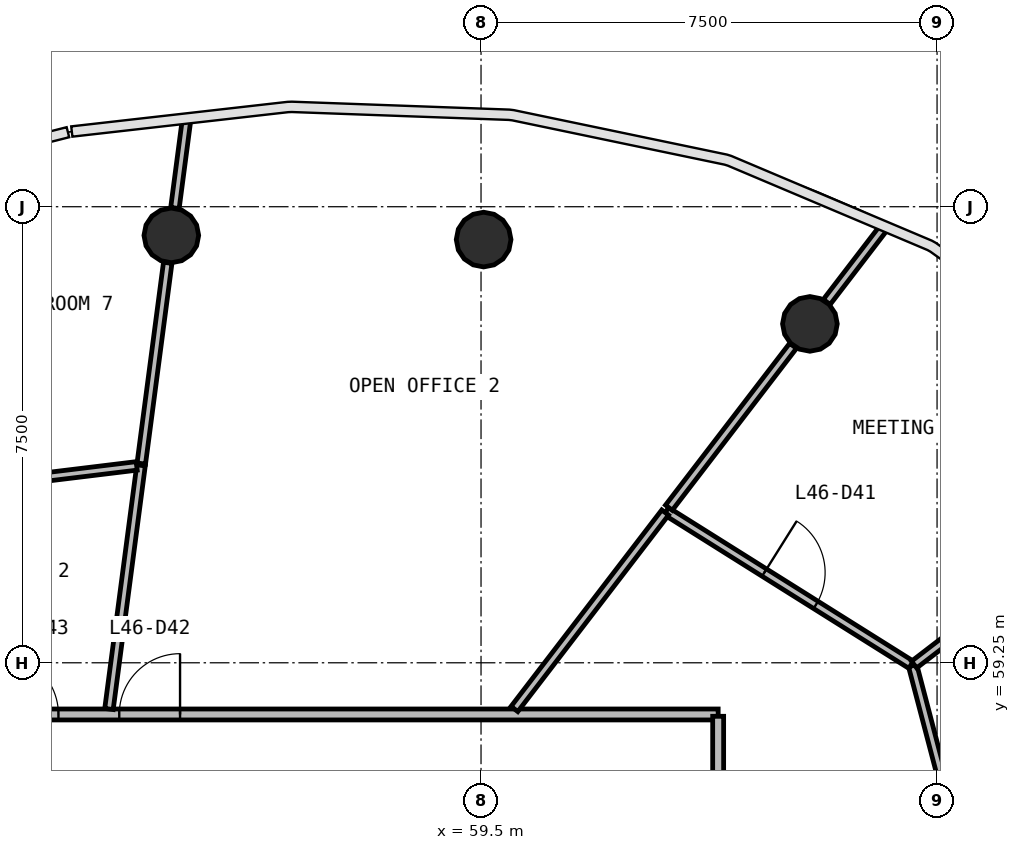
"""IFC4 building model, lengths in metres.
Left out: names, types, materials, properties, quantities, classifications, styles, units other than length and angle.
Written with IfcOpenShell. Run it as: python <this file> out.ifc"""

import sys

from ifc_helpers import new_model, si_unit, direction, frame, frame_2d, origin, origin_2d, place, context, subcontext, project, spatial, rectangle, circle, extrude, source, transform, mapped, element, fill, save


model = new_model("IFC4")
c1 = context("Model", 3, precision=1e-05, world=origin(), true_north=direction((0.0, 1.0)))
c2 = subcontext(c1, "Body", "Model", "MODEL_VIEW")
j1 = project(units=[si_unit("LENGTHUNIT", "METRE"), si_unit("PLANEANGLEUNIT", "RADIAN")], contexts=[c1])
p1 = place(None, origin())
s1 = spatial("IfcSite", under=j1, at=p1, CompositionType="ELEMENT")
p2 = place(p1, origin())
s2 = spatial("IfcBuilding", under=s1, at=p2, CompositionType="ELEMENT")
p3 = place(p2, frame((0.0, 0.0, 191.6)))
s3 = spatial("IfcBuildingStorey", under=s2, at=p3, CompositionType="ELEMENT", Elevation=191.6)
m1 = source(origin(), c2, "Body", "SweptSolid", [
    extrude(circle(Radius=0.45, at=origin_2d()), origin(), (0.0, 0.0, 1.0), 3.9),
])
for number, where, z_axis, x_axis in (
    (1, (64.909, 64.823, 0.0), (0.0, 0.0, 1.0), (1.0, 0.0, 0.0)),
    (2, (59.543, 66.21, 0.0), (0.0, 0.0, 1.0), (1.0, 0.0, 0.0)),
    (3, (54.406, 66.278, 0.0), (0.0, 0.0, 1.0), (1.0, 0.0, 0.0)),
):
    element("IfcColumn", number, at=place(p3, frame(where, z_axis=z_axis, x_axis=x_axis)), inside=s3, PredefinedType="COLUMN", context=c2, shape_type="MappedRepresentation", body=[
        mapped(m1, transform((0.0, 0.0, 0.0), scale=1.0)),
    ])
p4 = place(p3, frame((40.6, 58.4, 0.0), z_axis=(0.0, 0.0, 1.0), x_axis=(1.0, 0.0, 0.0)))
e4 = element("IfcWall", 4, at=p4, inside=s3, PredefinedType="PARTITIONING", context=c2, shape_type="SweptSolid", body=[
    extrude(rectangle(XDim=22.8, YDim=0.18, at=frame_2d((11.4, 0.0))), origin(), (0.0, 0.0, 1.0), 2.88),
])
p5 = place(p4, frame((12.95, 0.0, 0.0)))
e5 = element("IfcOpeningElement", 5, at=p5, cuts=e4, PredefinedType="OPENING", context=c2, shape_type="SweptSolid", body=[
    extrude(rectangle(XDim=1.0, YDim=2.1, at=frame_2d((0.5, 1.05))), frame((0.0, 0.1, 0.0), z_axis=(0.0, -1.0, 0.0), x_axis=(1.0, 0.0, 0.0)), (0.0, 0.0, 1.0), 0.2),
])
p6 = place(p4, frame((10.95, 0.0, 0.0)))
e6 = element("IfcOpeningElement", 6, at=p6, cuts=e4, PredefinedType="OPENING", context=c2, shape_type="SweptSolid", body=[
    extrude(rectangle(XDim=1.0, YDim=2.1, at=frame_2d((0.5, 1.05))), frame((0.0, 0.1, 0.0), z_axis=(0.0, -1.0, 0.0), x_axis=(1.0, 0.0, 0.0)), (0.0, 0.0, 1.0), 0.2),
])
p7 = place(p4, frame((5.75, 0.0, 0.0)))
e7 = element("IfcOpeningElement", 7, at=p7, cuts=e4, PredefinedType="OPENING", context=c2, shape_type="SweptSolid", body=[
    extrude(rectangle(XDim=1.0, YDim=2.1, at=frame_2d((0.5, 1.05))), frame((0.0, 0.1, 0.0), z_axis=(0.0, -1.0, 0.0), x_axis=(1.0, 0.0, 0.0)), (0.0, 0.0, 1.0), 0.2),
])
p8 = place(p3, frame((63.4, 58.37, 0.0), z_axis=(0.0, 0.0, 1.0), x_axis=(0.0, -1.0, 0.0)))
e8 = element("IfcWall", 8, at=p8, inside=s3, PredefinedType="PARTITIONING", context=c2, shape_type="SweptSolid", body=[
    extrude(rectangle(XDim=20.74, YDim=0.18, at=frame_2d((10.37, 0.0))), origin(), (0.0, 0.0, 1.0), 2.88),
])
p9 = place(p8, frame((9.89, 0.0, 0.0)))
e9 = element("IfcOpeningElement", 9, at=p9, cuts=e8, PredefinedType="OPENING", context=c2, shape_type="SweptSolid", body=[
    extrude(rectangle(XDim=1.0, YDim=2.1, at=frame_2d((0.5, 1.05))), frame((0.0, 0.1, 0.0), z_axis=(0.0, -1.0, 0.0), x_axis=(1.0, 0.0, 0.0)), (0.0, 0.0, 1.0), 0.2),
])
p10 = place(p8, frame((7.69, 0.0, 0.0)))
e10 = element("IfcOpeningElement", 10, at=p10, cuts=e8, PredefinedType="OPENING", context=c2, shape_type="SweptSolid", body=[
    extrude(rectangle(XDim=1.0, YDim=2.1, at=frame_2d((0.5, 1.05))), frame((0.0, 0.1, 0.0), z_axis=(0.0, -1.0, 0.0), x_axis=(1.0, 0.0, 0.0)), (0.0, 0.0, 1.0), 0.2),
])
p11 = place(p3, frame((66.599, 59.202, 0.0), z_axis=(0.0, 0.0, 1.0), x_axis=(0.253980714002, -0.967209282893, 0.0)))
e11 = element("IfcWall", 11, at=p11, inside=s3, PredefinedType="PARTITIONING", context=c2, shape_type="SweptSolid", body=[
    extrude(rectangle(XDim=4.736, YDim=0.14, at=frame_2d((2.368, 0.0))), origin(), (0.0, 0.0, 1.0), 2.88),
])
p12 = place(p11, frame((1.886, 0.0, 0.0)))
e12 = element("IfcOpeningElement", 12, at=p12, cuts=e11, PredefinedType="OPENING", context=c2, shape_type="SweptSolid", body=[
    extrude(rectangle(XDim=1.0, YDim=2.1, at=frame_2d((0.5, 1.05))), frame((0.0, 0.08, 0.0), z_axis=(0.0, -1.0, 0.0), x_axis=(1.0, 0.0, 0.0)), (0.0, 0.0, 1.0), 0.16),
])
p13 = place(p3, frame((62.547, 61.745, 0.0), z_axis=(0.0, 0.0, 1.0), x_axis=(0.846992708554, -0.531604506806, 0.0)))
e13 = element("IfcWall", 13, at=p13, inside=s3, PredefinedType="PARTITIONING", context=c2, shape_type="SweptSolid", body=[
    extrude(rectangle(XDim=4.754, YDim=0.14, at=frame_2d((2.377, 0.0))), origin(), (0.0, 0.0, 1.0), 2.88),
])
p14 = place(p13, frame((1.904, 0.0, 0.0)))
e14 = element("IfcOpeningElement", 14, at=p14, cuts=e13, PredefinedType="OPENING", context=c2, shape_type="SweptSolid", body=[
    extrude(rectangle(XDim=1.0, YDim=2.1, at=frame_2d((0.5, 1.05))), frame((0.0, 0.08, 0.0), z_axis=(0.0, -1.0, 0.0), x_axis=(1.0, 0.0, 0.0)), (0.0, 0.0, 1.0), 0.16),
])
p15 = place(p3, frame((60.049, 58.49, 0.0), z_axis=(0.0, 0.0, 1.0), x_axis=(0.608739821429, 0.793369919903, 0.0)))
e15 = element("IfcWall", 15, at=p15, inside=s3, PredefinedType="PARTITIONING", context=c2, shape_type="SweptSolid", body=[
    extrude(rectangle(XDim=4.073, YDim=0.14, at=frame_2d((2.036, 0.0))), origin(), (0.0, 0.0, 1.0), 2.88),
])
p16 = place(p3, frame((53.381, 58.49, 0.0), z_axis=(0.0, 0.0, 1.0), x_axis=(0.130493581912, 0.991449154057, 0.0)))
e16 = element("IfcWall", 16, at=p16, inside=s3, PredefinedType="PARTITIONING", context=c2, shape_type="SweptSolid", body=[
    extrude(rectangle(XDim=4.041, YDim=0.14, at=frame_2d((2.021, 0.0))), origin(), (0.0, 0.0, 1.0), 2.88),
])
p17 = place(p3, frame((50.152, 62.039, 0.0), z_axis=(0.0, 0.0, 1.0), x_axis=(0.992659556224, 0.120942157407, 0.0)))
e17 = element("IfcWall", 17, at=p17, inside=s3, PredefinedType="PARTITIONING", context=c2, shape_type="SweptSolid", body=[
    extrude(rectangle(XDim=3.712, YDim=0.14, at=frame_2d((1.856, 0.0))), origin(), (0.0, 0.0, 1.0), 2.88),
])
p18 = place(p17, frame((1.262, 0.0, 0.0)))
e18 = element("IfcOpeningElement", 18, at=p18, cuts=e17, PredefinedType="OPENING", context=c2, shape_type="SweptSolid", body=[
    extrude(rectangle(XDim=1.0, YDim=2.1, at=frame_2d((0.5, 1.05))), frame((0.0, 0.08, 0.0), z_axis=(0.0, -1.0, 0.0), x_axis=(1.0, 0.0, 0.0)), (0.0, 0.0, 1.0), 0.16),
])
p19 = place(p3, frame((66.622, 59.22, 0.0), z_axis=(0.0, 0.0, 1.0), x_axis=(0.793364115727, 0.60874738593, 0.0)))
e19 = element("IfcWall", 19, at=p19, inside=s3, PredefinedType="PARTITIONING", context=c2, shape_type="SweptSolid", body=[
    extrude(rectangle(XDim=3.553, YDim=0.14, at=frame_2d((1.777, 0.0))), origin(), (0.0, 0.0, 1.0), 2.88),
])
p20 = place(p3, frame((62.59, 61.801, 0.0), z_axis=(0.0, 0.0, 1.0), x_axis=(0.608788963613, 0.793332211487, 0.0)))
e20 = element("IfcWall", 20, at=p20, inside=s3, PredefinedType="PARTITIONING", context=c2, shape_type="SweptSolid", body=[
    extrude(rectangle(XDim=3.355, YDim=0.14, at=frame_2d((1.677, 0.0))), origin(), (0.0, 0.0, 1.0), 2.88),
])
p21 = place(p3, frame((53.912, 62.526, 0.0), z_axis=(0.0, 0.0, 1.0), x_axis=(0.130583483351, 0.991437317169, 0.0)))
e21 = element("IfcWall", 21, at=p21, inside=s3, PredefinedType="PARTITIONING", context=c2, shape_type="SweptSolid", body=[
    extrude(rectangle(XDim=3.33, YDim=0.14, at=frame_2d((1.665, 0.0))), origin(), (0.0, 0.0, 1.0), 2.88),
])
p22 = place(p3, frame((65.186, 65.184, 0.0), z_axis=(0.0, 0.0, 1.0), x_axis=(0.608734333178, 0.793374130919, 0.0)))
e22 = element("IfcWall", 22, at=p22, inside=s3, PredefinedType="PARTITIONING", context=c2, shape_type="SweptSolid", body=[
    extrude(rectangle(XDim=1.523, YDim=0.14, at=frame_2d((0.762, 0.0))), origin(), (0.0, 0.0, 1.0), 2.88),
])
p23 = place(p3, frame((54.466, 66.729, 0.0), z_axis=(0.0, 0.0, 1.0), x_axis=(0.130472090904, 0.991451982445, 0.0)))
e23 = element("IfcWall", 23, at=p23, inside=s3, PredefinedType="PARTITIONING", context=c2, shape_type="SweptSolid", body=[
    extrude(rectangle(XDim=1.437, YDim=0.14, at=frame_2d((0.719, 0.0))), origin(), (0.0, 0.0, 1.0), 2.88),
])
m2 = source(origin(), c2, "Body", "SweptSolid", [
    extrude(rectangle(XDim=1.0, YDim=2.1, at=frame_2d((0.5, 1.05))), frame((0.0, 0.025, 0.0), z_axis=(0.0, -1.0, 0.0), x_axis=(1.0, 0.0, 0.0)), (0.0, 0.0, 1.0), 0.05),
])
p24 = place(p14, origin())
e24 = element("IfcDoor", 24, at=p24, inside=s3, OperationType="SINGLE_SWING_LEFT", PredefinedType="DOOR", context=c2, shape_type="MappedRepresentation", body=[
    mapped(m2, transform((0.0, 0.0, 0.0), scale=1.0)),
])
fill(e14, e24)
p25 = place(p5, origin())
e25 = element("IfcDoor", 25, at=p25, inside=s3, OperationType="SINGLE_SWING_RIGHT", PredefinedType="DOOR", context=c2, shape_type="MappedRepresentation", body=[
    mapped(m2, transform((0.0, 0.0, 0.0), scale=1.0)),
])
fill(e5, e25)
p26 = place(p6, origin())
e26 = element("IfcDoor", 26, at=p26, inside=s3, OperationType="SINGLE_SWING_LEFT", PredefinedType="DOOR", context=c2, shape_type="MappedRepresentation", body=[
    mapped(m2, transform((0.0, 0.0, 0.0), scale=1.0)),
])
fill(e6, e26)
save(model, sys.argv[1])
